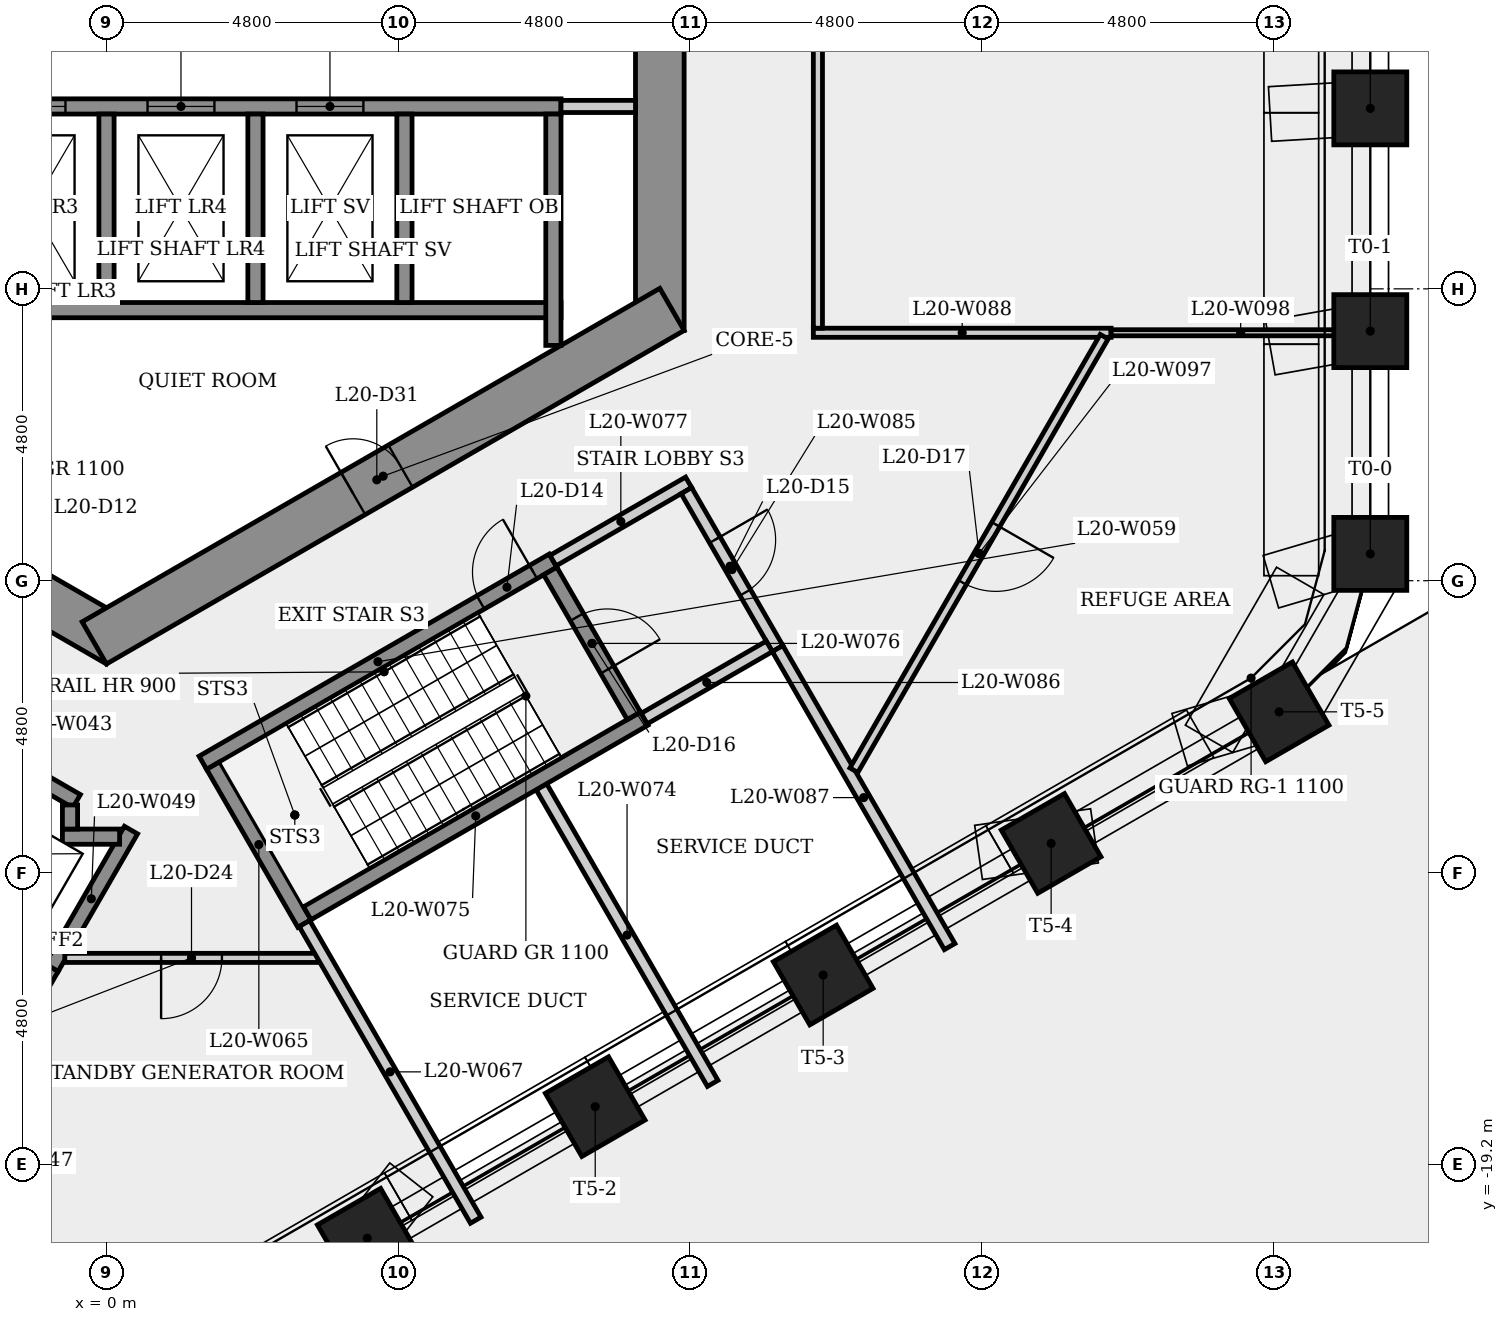
"""IFC4 building model, lengths in metres.
Left out: names, types, materials, properties, quantities, classifications, styles, units other than length and angle.
Written with IfcOpenShell. Run it as: python <this file> out.ifc"""

import sys

from ifc_helpers import new_model, si_unit, direction, frame, frame_2d, origin, origin_2d, place, context, subcontext, project, spatial, rectangle, extrude, element, fill, save


model = new_model("IFC4")
c1 = context("Model", 3, precision=1e-05, world=origin(), true_north=direction((0.0, 1.0)))
c2 = subcontext(c1, "Body", "Model", "MODEL_VIEW")
j1 = project(units=[si_unit("LENGTHUNIT", "METRE"), si_unit("PLANEANGLEUNIT", "RADIAN")], contexts=[c1])
p1 = place(None, origin())
s1 = spatial("IfcSite", under=j1, at=p1, CompositionType="ELEMENT")
p2 = place(p1, origin())
s2 = spatial("IfcBuilding", under=s1, at=p2, CompositionType="ELEMENT")
p3 = place(p2, frame((0.0, 0.0, 78.3)))
s3 = spatial("IfcBuildingStorey", under=s2, at=p3, CompositionType="ELEMENT", Elevation=78.3)
p4 = place(p3, frame((9.1, -5.485, 0.0), z_axis=(0.0, 0.0, 1.0), x_axis=(0.0, 1.0, 0.0)))
e1 = element("IfcWall", 1, at=p4, inside=s3, PredefinedType="SHEAR", context=c2, shape_type="SweptSolid", body=[
    extrude(rectangle(XDim=10.97, YDim=0.8, at=frame_2d((5.485, 0.0))), origin(), (0.0, 0.0, 1.0), 4.8),
])
p5 = place(p4, frame((4.685, 0.0, 0.0)))
e2 = element("IfcOpeningElement", 2, at=p5, cuts=e1, PredefinedType="OPENING", context=c2, shape_type="SweptSolid", body=[
    extrude(rectangle(XDim=1.6, YDim=2.1, at=frame_2d((0.8, 1.05))), frame((0.0, 0.41, 0.0), z_axis=(0.0, -1.0, 0.0), x_axis=(1.0, 0.0, 0.0)), (0.0, 0.0, 1.0), 0.82),
])
p6 = place(p3, frame((-9.3, -5.138, 0.0), z_axis=(0.0, 0.0, 1.0), x_axis=(0.866023993627, -0.500002442456, 0.0)))
e3 = element("IfcWall", 3, at=p6, inside=s3, PredefinedType="SHEAR", context=c2, shape_type="SweptSolid", body=[
    extrude(rectangle(XDim=10.97, YDim=0.8, at=frame_2d((5.485, 0.0))), origin(), (0.0, 0.0, 1.0), 4.8),
])
p7 = place(p6, frame((2.091, 0.0, 0.0)))
e4 = element("IfcOpeningElement", 4, at=p7, cuts=e3, PredefinedType="OPENING", context=c2, shape_type="SweptSolid", body=[
    extrude(rectangle(XDim=0.9, YDim=2.1, at=frame_2d((0.45, 1.05))), frame((0.0, 0.41, 0.0), z_axis=(0.0, -1.0, 0.0), x_axis=(1.0, 0.0, 0.0)), (0.0, 0.0, 1.0), 0.82),
])
p8 = place(p3, frame((-0.2, -10.623, 0.0), z_axis=(0.0, 0.0, 1.0), x_axis=(0.866023993627, 0.500002442456, 0.0)))
e5 = element("IfcWall", 5, at=p8, inside=s3, PredefinedType="SHEAR", context=c2, shape_type="SweptSolid", body=[
    extrude(rectangle(XDim=10.97, YDim=0.8, at=frame_2d((5.485, 0.0))), origin(), (0.0, 0.0, 1.0), 4.8),
])
p9 = place(p8, frame((4.914, 0.0, 0.0)))
e6 = element("IfcOpeningElement", 6, at=p9, cuts=e5, PredefinedType="OPENING", context=c2, shape_type="SweptSolid", body=[
    extrude(rectangle(XDim=0.9, YDim=2.1, at=frame_2d((0.45, 1.05))), frame((0.0, 0.41, 0.0), z_axis=(0.0, -1.0, 0.0), x_axis=(1.0, 0.0, 0.0)), (0.0, 0.0, 1.0), 0.82),
])
for number, where, z_axis, x_axis in (
    (7, (20.785, -9.159, 0.0), (0.0, 0.0, 1.0), (1.0, 0.0, 0.0)),
    (8, (20.785, -5.495, 0.0), (0.0, 0.0, 1.0), (1.0, 0.0, 0.0)),
    (9, (20.785, -1.832, 0.0), (0.0, 0.0, 1.0), (1.0, 0.0, 0.0)),
    (10, (4.289, -20.415, 0.0), (0.0, 0.0, 1.0), (0.5, -0.866, 0.0)),
    (11, (8.038, -18.25, 0.0), (0.0, 0.0, 1.0), (0.5, -0.866, 0.0)),
    (12, (11.787, -16.086, 0.0), (0.0, 0.0, 1.0), (0.5, -0.866, 0.0)),
    (13, (15.536, -13.921, 0.0), (0.0, 0.0, 1.0), (0.5, -0.866, 0.0)),
    (14, (19.285, -11.757, 0.0), (0.0, 0.0, 1.0), (0.5, -0.866, 0.0)),
):
    element("IfcColumn", number, at=place(p3, frame(where, z_axis=z_axis, x_axis=x_axis)), inside=s3, PredefinedType="COLUMN", context=c2, shape_type="SweptSolid", body=[
        extrude(rectangle(XDim=1.2, YDim=1.2, at=origin_2d()), origin(), (0.0, 0.0, 1.0), 4.45),
    ])
p10 = place(p3, frame((-7.225, -5.15, 0.0), z_axis=(0.0, 0.0, 1.0), x_axis=(1.0, 0.0, 0.0)))
e15 = element("IfcWall", 15, at=p10, inside=s3, PredefinedType="SHEAR", context=c2, shape_type="SweptSolid", body=[
    extrude(rectangle(XDim=14.7, YDim=0.25, at=frame_2d((7.35, 0.0))), origin(), (0.0, 0.0, 1.0), 4.45),
])
p11 = place(p3, frame((-7.225, -1.8, 0.0), z_axis=(0.0, 0.0, 1.0), x_axis=(1.0, 0.0, 0.0)))
e16 = element("IfcWall", 16, at=p11, inside=s3, PredefinedType="SHEAR", context=c2, shape_type="SweptSolid", body=[
    extrude(rectangle(XDim=14.7, YDim=0.25, at=frame_2d((7.35, 0.0))), origin(), (0.0, 0.0, 1.0), 4.45),
])
p12 = place(p11, frame((0.597, 0.0, 0.0)))
e17 = element("IfcOpeningElement", 17, at=p12, cuts=e16, PredefinedType="OPENING", context=c2, shape_type="SweptSolid", body=[
    extrude(rectangle(XDim=1.1, YDim=2.1, at=frame_2d((0.55, 1.05))), frame((0.0, 0.135, 0.0), z_axis=(0.0, -1.0, 0.0), x_axis=(1.0, 0.0, 0.0)), (0.0, 0.0, 1.0), 0.27),
])
p13 = place(p11, frame((3.0, 0.0, 0.0)))
e18 = element("IfcOpeningElement", 18, at=p13, cuts=e16, PredefinedType="OPENING", context=c2, shape_type="SweptSolid", body=[
    extrude(rectangle(XDim=1.1, YDim=2.1, at=frame_2d((0.55, 1.05))), frame((0.0, 0.135, 0.0), z_axis=(0.0, -1.0, 0.0), x_axis=(1.0, 0.0, 0.0)), (0.0, 0.0, 1.0), 0.27),
])
p14 = place(p11, frame((5.45, 0.0, 0.0)))
e19 = element("IfcOpeningElement", 19, at=p14, cuts=e16, PredefinedType="OPENING", context=c2, shape_type="SweptSolid", body=[
    extrude(rectangle(XDim=1.1, YDim=2.1, at=frame_2d((0.55, 1.05))), frame((0.0, 0.135, 0.0), z_axis=(0.0, -1.0, 0.0), x_axis=(1.0, 0.0, 0.0)), (0.0, 0.0, 1.0), 0.27),
])
p15 = place(p11, frame((7.9, 0.0, 0.0)))
e20 = element("IfcOpeningElement", 20, at=p15, cuts=e16, PredefinedType="OPENING", context=c2, shape_type="SweptSolid", body=[
    extrude(rectangle(XDim=1.1, YDim=2.1, at=frame_2d((0.55, 1.05))), frame((0.0, 0.135, 0.0), z_axis=(0.0, -1.0, 0.0), x_axis=(1.0, 0.0, 0.0)), (0.0, 0.0, 1.0), 0.27),
])
p16 = place(p11, frame((10.35, 0.0, 0.0)))
e21 = element("IfcOpeningElement", 21, at=p16, cuts=e16, PredefinedType="OPENING", context=c2, shape_type="SweptSolid", body=[
    extrude(rectangle(XDim=1.1, YDim=2.1, at=frame_2d((0.55, 1.05))), frame((0.0, 0.135, 0.0), z_axis=(0.0, -1.0, 0.0), x_axis=(1.0, 0.0, 0.0)), (0.0, 0.0, 1.0), 0.27),
])
p17 = place(p3, frame((-2.364, -12.145, 0.0), z_axis=(0.0, 0.0, 1.0), x_axis=(0.86603892542, -0.499976579108, 0.0)))
e22 = element("IfcWall", 22, at=p17, inside=s3, PredefinedType="SHEAR", context=c2, shape_type="SweptSolid", body=[
    extrude(rectangle(XDim=2.162, YDim=0.25, at=frame_2d((1.081, 0.0))), origin(), (0.0, 0.0, 1.0), 4.45),
])
p18 = place(p3, frame((-0.856, -16.133, 0.0), z_axis=(0.0, 0.0, 1.0), x_axis=(-0.866021716278, 0.500006386895, 0.0)))
e23 = element("IfcWall", 23, at=p18, inside=s3, PredefinedType="SHEAR", context=c2, shape_type="SweptSolid", body=[
    extrude(rectangle(XDim=3.3, YDim=0.25, at=frame_2d((1.65, 0.0))), origin(), (0.0, 0.0, 1.0), 4.45),
])
p19 = place(p3, frame((-0.902, -15.962, 0.0), z_axis=(0.0, 0.0, 1.0), x_axis=(0.499981517636, 0.866036074319, 0.0)))
e24 = element("IfcWall", 24, at=p19, inside=s3, PredefinedType="SHEAR", context=c2, shape_type="SweptSolid", body=[
    extrude(rectangle(XDim=2.61, YDim=0.25, at=frame_2d((1.305, 0.0))), origin(), (0.0, 0.0, 1.0), 4.45),
])
p20 = place(p3, frame((-0.725, -13.81, 0.0), z_axis=(0.0, 0.0, 1.0), x_axis=(1.0, 0.0, 0.0)))
e25 = element("IfcWall", 25, at=p20, inside=s3, PredefinedType="SHEAR", context=c2, shape_type="SweptSolid", body=[
    extrude(rectangle(XDim=0.941, YDim=0.25, at=frame_2d((0.47, 0.0))), origin(), (0.0, 0.0, 1.0), 4.8),
])
p21 = place(p3, frame((-0.6, -13.289, 0.0), z_axis=(0.0, 0.0, 1.0), x_axis=(0.0, -1.0, 0.0)))
e26 = element("IfcWall", 26, at=p21, inside=s3, PredefinedType="SHEAR", context=c2, shape_type="SweptSolid", body=[
    extrude(rectangle(XDim=0.396, YDim=0.25, at=frame_2d((0.198, 0.0))), origin(), (0.0, 0.0, 1.0), 4.8),
])
p22 = place(p3, frame((0.0, -1.925, 0.0), z_axis=(0.0, 0.0, 1.0), x_axis=(0.0, -1.0, 0.0)))
e27 = element("IfcWall", 27, at=p22, inside=s3, PredefinedType="SHEAR", context=c2, shape_type="SweptSolid", body=[
    extrude(rectangle(XDim=3.1, YDim=0.25, at=frame_2d((1.55, 0.0))), origin(), (0.0, 0.0, 1.0), 4.8),
])
p23 = place(p3, frame((1.585, -12.595, 0.0), z_axis=(0.0, 0.0, 1.0), x_axis=(0.866036417653, 0.499980922934, 0.0)))
e28 = element("IfcWall", 28, at=p23, inside=s3, PredefinedType="SHEAR", context=c2, shape_type="SweptSolid", body=[
    extrude(rectangle(XDim=6.65, YDim=0.25, at=frame_2d((3.325, 0.0))), origin(), (0.0, 0.0, 1.0), 4.45),
])
p24 = place(p23, frame((5.275, 0.0, 0.0)))
e29 = element("IfcOpeningElement", 29, at=p24, cuts=e28, PredefinedType="OPENING", context=c2, shape_type="SweptSolid", body=[
    extrude(rectangle(XDim=1.0, YDim=2.1, at=frame_2d((0.5, 1.05))), frame((0.0, 0.135, 0.0), z_axis=(0.0, -1.0, 0.0), x_axis=(1.0, 0.0, 0.0)), (0.0, 0.0, 1.0), 0.27),
])
p25 = place(p3, frame((2.45, -1.925, 0.0), z_axis=(0.0, 0.0, 1.0), x_axis=(0.0, -1.0, 0.0)))
e30 = element("IfcWall", 30, at=p25, inside=s3, PredefinedType="SHEAR", context=c2, shape_type="SweptSolid", body=[
    extrude(rectangle(XDim=3.1, YDim=0.25, at=frame_2d((1.55, 0.0))), origin(), (0.0, 0.0, 1.0), 4.8),
])
p26 = place(p3, frame((3.256, -15.239, 0.0), z_axis=(0.0, 0.0, 1.0), x_axis=(-0.50002537861, 0.866010750942, 0.0)))
e31 = element("IfcWall", 31, at=p26, inside=s3, PredefinedType="SHEAR", context=c2, shape_type="SweptSolid", body=[
    extrude(rectangle(XDim=3.0, YDim=0.25, at=frame_2d((1.5, 0.0))), origin(), (0.0, 0.0, 1.0), 4.45),
])
p27 = place(p3, frame((3.482, -15.804, 0.0), z_axis=(0.0, 0.0, 1.0), x_axis=(-1.0, 0.0, 0.0)))
e32 = element("IfcWall", 32, at=p27, inside=s3, PredefinedType="PARTITIONING", context=c2, shape_type="SweptSolid", body=[
    extrude(rectangle(XDim=4.167, YDim=0.15, at=frame_2d((2.083, 0.0))), origin(), (0.0, 0.0, 1.0), 4.45),
])
p28 = place(p27, frame((1.583, 0.0, 0.0)))
e33 = element("IfcOpeningElement", 33, at=p28, cuts=e32, PredefinedType="OPENING", context=c2, shape_type="SweptSolid", body=[
    extrude(rectangle(XDim=1.0, YDim=2.1, at=frame_2d((0.5, 1.05))), frame((0.0, 0.085, 0.0), z_axis=(0.0, -1.0, 0.0), x_axis=(1.0, 0.0, 0.0)), (0.0, 0.0, 1.0), 0.17),
])
p29 = place(p3, frame((3.256, -15.239, 0.0), z_axis=(0.0, 0.0, 1.0), x_axis=(0.499988783044, -0.8660318798, 0.0)))
e34 = element("IfcWall", 34, at=p29, inside=s3, PredefinedType="PLUMBINGWALL", context=c2, shape_type="SweptSolid", body=[
    extrude(rectangle(XDim=5.634, YDim=0.2, at=frame_2d((2.817, 0.0))), origin(), (0.0, 0.0, 1.0), 4.45),
])
p30 = place(p3, frame((4.9, -1.925, 0.0), z_axis=(0.0, 0.0, 1.0), x_axis=(0.0, -1.0, 0.0)))
e35 = element("IfcWall", 35, at=p30, inside=s3, PredefinedType="SHEAR", context=c2, shape_type="SweptSolid", body=[
    extrude(rectangle(XDim=3.1, YDim=0.25, at=frame_2d((1.55, 0.0))), origin(), (0.0, 0.0, 1.0), 4.8),
])
p31 = place(p3, frame((7.153, -12.989, 0.0), z_axis=(0.0, 0.0, 1.0), x_axis=(0.500021283045, -0.866013115664, 0.0)))
e36 = element("IfcWall", 36, at=p31, inside=s3, PredefinedType="PLUMBINGWALL", context=c2, shape_type="SweptSolid", body=[
    extrude(rectangle(XDim=5.634, YDim=0.2, at=frame_2d((2.817, 0.0))), origin(), (0.0, 0.0, 1.0), 4.45),
])
p32 = place(p3, frame((3.301, -15.068, 0.0), z_axis=(0.0, 0.0, 1.0), x_axis=(0.866035036182, 0.499983315828, 0.0)))
e37 = element("IfcWall", 37, at=p32, inside=s3, PredefinedType="SHEAR", context=c2, shape_type="SweptSolid", body=[
    extrude(rectangle(XDim=6.4, YDim=0.25, at=frame_2d((3.2, 0.0))), origin(), (0.0, 0.0, 1.0), 4.45),
])
p33 = place(p3, frame((7.298, -9.441, 0.0), z_axis=(0.0, 0.0, 1.0), x_axis=(0.500034990121, -0.866005201286, 0.0)))
e38 = element("IfcWall", 38, at=p33, inside=s3, PredefinedType="SHEAR", context=c2, shape_type="SweptSolid", body=[
    extrude(rectangle(XDim=2.75, YDim=0.25, at=frame_2d((1.375, 0.0))), origin(), (0.0, 0.0, 1.0), 4.45),
])
p34 = place(p33, frame((0.875, 0.0, 0.0)))
e39 = element("IfcOpeningElement", 39, at=p34, cuts=e38, PredefinedType="OPENING", context=c2, shape_type="SweptSolid", body=[
    extrude(rectangle(XDim=1.0, YDim=2.1, at=frame_2d((0.5, 1.05))), frame((0.0, 0.135, 0.0), z_axis=(0.0, -1.0, 0.0), x_axis=(1.0, 0.0, 0.0)), (0.0, 0.0, 1.0), 0.27),
])
p35 = place(p3, frame((7.344, -9.27, 0.0), z_axis=(0.0, 0.0, 1.0), x_axis=(0.866005588531, 0.500034319456, 0.0)))
e40 = element("IfcWall", 40, at=p35, inside=s3, PredefinedType="PARTITIONING", context=c2, shape_type="SweptSolid", body=[
    extrude(rectangle(XDim=2.575, YDim=0.2, at=frame_2d((1.288, 0.0))), origin(), (0.0, 0.0, 1.0), 4.45),
])
p36 = place(p3, frame((7.35, -1.925, 0.0), z_axis=(0.0, 0.0, 1.0), x_axis=(0.0, -1.0, 0.0)))
e41 = element("IfcWall", 41, at=p36, inside=s3, PredefinedType="SHEAR", context=c2, shape_type="SweptSolid", body=[
    extrude(rectangle(XDim=3.805, YDim=0.25, at=frame_2d((1.903, 0.0))), origin(), (0.0, 0.0, 1.0), 4.45),
])
p37 = place(p3, frame((8.7, -1.8, 0.0), z_axis=(0.0, 0.0, 1.0), x_axis=(-1.0, 0.0, 0.0)))
e42 = element("IfcWall", 42, at=p37, inside=s3, PredefinedType="PARTITIONING", context=c2, shape_type="SweptSolid", body=[
    extrude(rectangle(XDim=1.225, YDim=0.2, at=frame_2d((0.613, 0.0))), origin(), (0.0, 0.0, 1.0), 4.45),
])
p38 = place(p3, frame((9.537, -8.119, 0.0), z_axis=(0.0, 0.0, 1.0), x_axis=(0.499990139034, -0.866031096941, 0.0)))
e43 = element("IfcWall", 43, at=p38, inside=s3, PredefinedType="PARTITIONING", context=c2, shape_type="SweptSolid", body=[
    extrude(rectangle(XDim=3.0, YDim=0.2, at=frame_2d((1.5, 0.0))), origin(), (0.0, 0.0, 1.0), 4.45),
])
p39 = place(p38, frame((0.935, 0.0, 0.0)))
e44 = element("IfcOpeningElement", 44, at=p39, cuts=e43, PredefinedType="OPENING", context=c2, shape_type="SweptSolid", body=[
    extrude(rectangle(XDim=1.0, YDim=2.1, at=frame_2d((0.5, 1.05))), frame((0.0, 0.11, 0.0), z_axis=(0.0, -1.0, 0.0), x_axis=(1.0, 0.0, 0.0)), (0.0, 0.0, 1.0), 0.22),
])
p40 = place(p3, frame((10.901, -10.681, 0.0), z_axis=(0.0, 0.0, 1.0), x_axis=(-0.866007538022, -0.500030943131, 0.0)))
e45 = element("IfcWall", 45, at=p40, inside=s3, PredefinedType="PLUMBINGWALL", context=c2, shape_type="SweptSolid", body=[
    extrude(rectangle(XDim=2.375, YDim=0.2, at=frame_2d((1.188, 0.0))), origin(), (0.0, 0.0, 1.0), 4.45),
])
p41 = place(p3, frame((11.037, -10.717, 0.0), z_axis=(0.0, 0.0, 1.0), x_axis=(0.49999508309, -0.866028242545, 0.0)))
e46 = element("IfcWall", 46, at=p41, inside=s3, PredefinedType="PLUMBINGWALL", context=c2, shape_type="SweptSolid", body=[
    extrude(rectangle(XDim=5.659, YDim=0.2, at=frame_2d((2.829, 0.0))), origin(), (0.0, 0.0, 1.0), 4.45),
])
p42 = place(p3, frame((11.625, -5.522, 0.0), z_axis=(0.0, 0.0, 1.0), x_axis=(1.0, 0.0, 0.0)))
e47 = element("IfcWall", 47, at=p42, inside=s3, PredefinedType="PARTITIONING", context=c2, shape_type="SweptSolid", body=[
    extrude(rectangle(XDim=4.896, YDim=0.15, at=frame_2d((2.448, 0.0))), origin(), (0.0, 0.0, 1.0), 4.45),
])
p43 = place(p3, frame((11.7, 5.197, 0.0), z_axis=(0.0, 0.0, 1.0), x_axis=(0.0, -1.0, 0.0)))
e48 = element("IfcWall", 48, at=p43, inside=s3, PredefinedType="PARTITIONING", context=c2, shape_type="SweptSolid", body=[
    extrude(rectangle(XDim=10.645, YDim=0.15, at=frame_2d((5.322, 0.0))), origin(), (0.0, 0.0, 1.0), 4.45),
])
p44 = place(p43, frame((4.86, 0.0, 0.0)))
e49 = element("IfcOpeningElement", 49, at=p44, cuts=e48, PredefinedType="OPENING", context=c2, shape_type="SweptSolid", body=[
    extrude(rectangle(XDim=1.0, YDim=2.1, at=frame_2d((0.5, 1.05))), frame((0.0, 0.085, 0.0), z_axis=(0.0, -1.0, 0.0), x_axis=(1.0, 0.0, 0.0)), (0.0, 0.0, 1.0), 0.17),
])
p45 = place(p3, frame((16.408, -5.587, 0.0), z_axis=(0.0, 0.0, 1.0), x_axis=(-0.499988554908, -0.866032011511, 0.0)))
e50 = element("IfcWall", 50, at=p45, inside=s3, PredefinedType="PARTITIONING", context=c2, shape_type="SweptSolid", body=[
    extrude(rectangle(XDim=8.233, YDim=0.15, at=frame_2d((4.117, 0.0))), origin(), (0.0, 0.0, 1.0), 4.45),
])
p46 = place(p45, frame((3.566, 0.0, 0.0)))
e51 = element("IfcOpeningElement", 51, at=p46, cuts=e50, PredefinedType="OPENING", context=c2, shape_type="SweptSolid", body=[
    extrude(rectangle(XDim=1.1, YDim=2.1, at=frame_2d((0.55, 1.05))), frame((0.0, 0.085, 0.0), z_axis=(0.0, -1.0, 0.0), x_axis=(1.0, 0.0, 0.0)), (0.0, 0.0, 1.0), 0.17),
])
p47 = place(p3, frame((16.521, -5.522, 0.0), z_axis=(0.0, 0.0, 1.0), x_axis=(1.0, 0.0, 0.0)))
e52 = element("IfcWall", 52, at=p47, inside=s3, PredefinedType="PARTITIONING", context=c2, shape_type="SweptSolid", body=[
    extrude(rectangle(XDim=4.264, YDim=0.1, at=frame_2d((2.132, 0.0))), origin(), (0.0, 0.0, 1.0), 2.425),
])
p48 = place(p14, origin())
e53 = element("IfcDoor", 53, at=p48, inside=s3, OperationType="SLIDING_TO_LEFT", PredefinedType="DOOR", context=c2, shape_type="SweptSolid", body=[
    extrude(rectangle(XDim=1.1, YDim=2.1, at=frame_2d((0.55, 1.05))), frame((0.0, 0.025, 0.0), z_axis=(0.0, -1.0, 0.0), x_axis=(1.0, 0.0, 0.0)), (0.0, 0.0, 1.0), 0.05),
])
fill(e19, e53)
p49 = place(p15, origin())
e54 = element("IfcDoor", 54, at=p49, inside=s3, OperationType="SLIDING_TO_LEFT", PredefinedType="DOOR", context=c2, shape_type="SweptSolid", body=[
    extrude(rectangle(XDim=1.1, YDim=2.1, at=frame_2d((0.55, 1.05))), frame((0.0, 0.025, 0.0), z_axis=(0.0, -1.0, 0.0), x_axis=(1.0, 0.0, 0.0)), (0.0, 0.0, 1.0), 0.05),
])
fill(e20, e54)
p50 = place(p16, origin())
e55 = element("IfcDoor", 55, at=p50, inside=s3, OperationType="SLIDING_TO_LEFT", PredefinedType="DOOR", context=c2, shape_type="SweptSolid", body=[
    extrude(rectangle(XDim=1.1, YDim=2.1, at=frame_2d((0.55, 1.05))), frame((0.0, 0.025, 0.0), z_axis=(0.0, -1.0, 0.0), x_axis=(1.0, 0.0, 0.0)), (0.0, 0.0, 1.0), 0.05),
])
fill(e21, e55)
p51 = place(p24, origin())
e56 = element("IfcDoor", 56, at=p51, inside=s3, OperationType="SINGLE_SWING_RIGHT", PredefinedType="DOOR", context=c2, shape_type="SweptSolid", body=[
    extrude(rectangle(XDim=1.0, YDim=2.1, at=frame_2d((0.5, 1.05))), frame((0.0, 0.025, 0.0), z_axis=(0.0, -1.0, 0.0), x_axis=(1.0, 0.0, 0.0)), (0.0, 0.0, 1.0), 0.05),
])
fill(e29, e56)
p52 = place(p39, origin())
e57 = element("IfcDoor", 57, at=p52, inside=s3, OperationType="SINGLE_SWING_LEFT", PredefinedType="DOOR", context=c2, shape_type="SweptSolid", body=[
    extrude(rectangle(XDim=1.0, YDim=2.1, at=frame_2d((0.5, 1.05))), frame((0.0, 0.025, 0.0), z_axis=(0.0, -1.0, 0.0), x_axis=(1.0, 0.0, 0.0)), (0.0, 0.0, 1.0), 0.05),
])
fill(e44, e57)
p53 = place(p34, origin())
e58 = element("IfcDoor", 58, at=p53, inside=s3, OperationType="SINGLE_SWING_RIGHT", PredefinedType="DOOR", context=c2, shape_type="SweptSolid", body=[
    extrude(rectangle(XDim=1.0, YDim=2.1, at=frame_2d((0.5, 1.05))), frame((0.0, 0.025, 0.0), z_axis=(0.0, -1.0, 0.0), x_axis=(1.0, 0.0, 0.0)), (0.0, 0.0, 1.0), 0.05),
])
fill(e39, e58)
p54 = place(p46, origin())
e59 = element("IfcDoor", 59, at=p54, inside=s3, OperationType="SINGLE_SWING_LEFT", PredefinedType="DOOR", context=c2, shape_type="SweptSolid", body=[
    extrude(rectangle(XDim=1.1, YDim=2.1, at=frame_2d((0.55, 1.05))), frame((0.0, 0.025, 0.0), z_axis=(0.0, -1.0, 0.0), x_axis=(1.0, 0.0, 0.0)), (0.0, 0.0, 1.0), 0.05),
])
fill(e51, e59)
p55 = place(p28, origin())
e60 = element("IfcDoor", 60, at=p55, inside=s3, OperationType="SINGLE_SWING_RIGHT", PredefinedType="DOOR", context=c2, shape_type="SweptSolid", body=[
    extrude(rectangle(XDim=1.0, YDim=2.1, at=frame_2d((0.5, 1.05))), frame((0.0, 0.025, 0.0), z_axis=(0.0, -1.0, 0.0), x_axis=(1.0, 0.0, 0.0)), (0.0, 0.0, 1.0), 0.05),
])
fill(e33, e60)
p56 = place(p9, origin())
e61 = element("IfcDoor", 61, at=p56, inside=s3, OperationType="SINGLE_SWING_LEFT", PredefinedType="DOOR", context=c2, shape_type="SweptSolid", body=[
    extrude(rectangle(XDim=0.9, YDim=2.1, at=frame_2d((0.45, 1.05))), frame((0.0, 0.025, 0.0), z_axis=(0.0, -1.0, 0.0), x_axis=(1.0, 0.0, 0.0)), (0.0, 0.0, 1.0), 0.05),
])
fill(e6, e61)
save(model, sys.argv[1])
